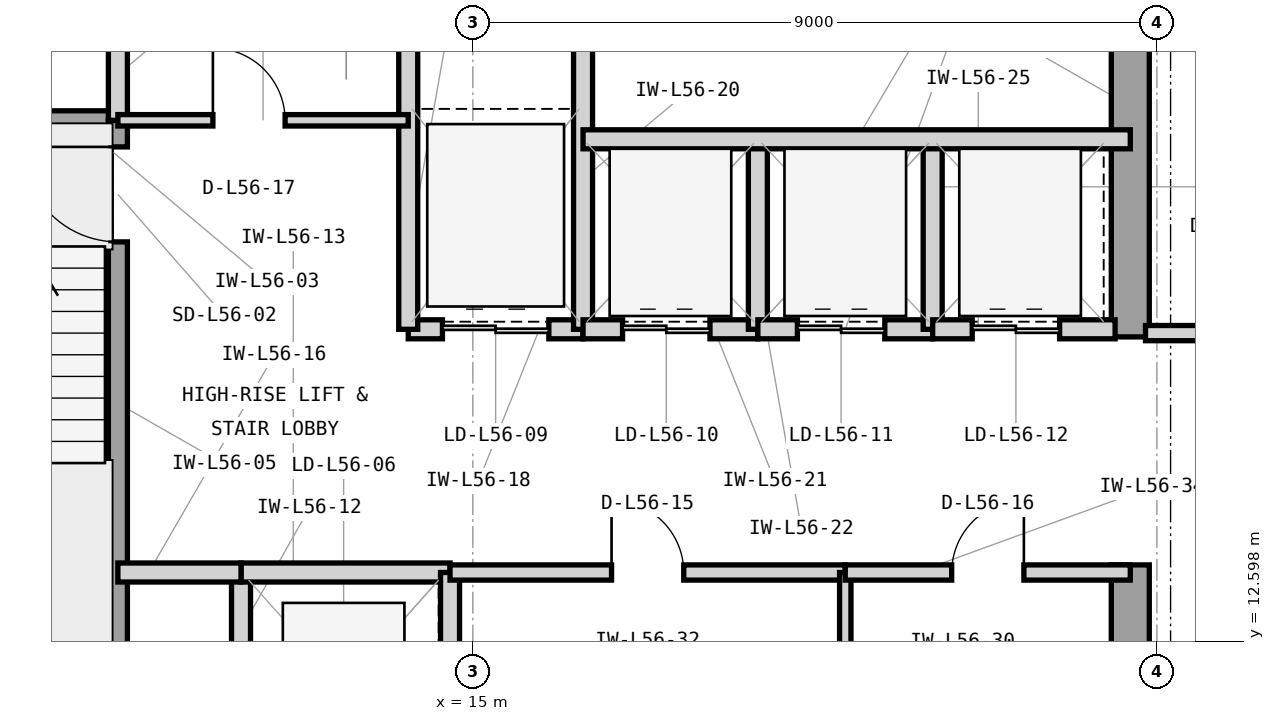
"""IFC4 building model, lengths in metres.
Left out: names, types, materials, properties, quantities, classifications, styles, units other than length and angle.
Written with IfcOpenShell. Run it as: python <this file> out.ifc"""

import sys

from ifc_helpers import new_model, si_unit, direction, frame, frame_2d, origin, place, context, subcontext, project, spatial, rectangle, extrude, element, fill, save


model = new_model("IFC4")
c1 = context("Model", 3, precision=1e-05, world=origin(), true_north=direction((0.0, 1.0)))
c2 = subcontext(c1, "Body", "Model", "MODEL_VIEW")
j1 = project(units=[si_unit("LENGTHUNIT", "METRE"), si_unit("PLANEANGLEUNIT", "RADIAN")], contexts=[c1])
p1 = place(None, origin())
s1 = spatial("IfcSite", under=j1, at=p1, CompositionType="ELEMENT")
p2 = place(p1, origin())
s2 = spatial("IfcBuilding", under=s1, at=p2, CompositionType="ELEMENT")
p3 = place(p2, frame((0.0, 0.0, 231.3)))
s3 = spatial("IfcBuildingStorey", under=s2, at=p3, CompositionType="ELEMENT", Elevation=231.3)
p4 = place(p3, frame((23.65, 10.4, 0.0), z_axis=(0.0, 0.0, 1.0), x_axis=(0.0, 1.0, 0.0)))
e1 = element("IfcWall", 1, at=p4, inside=s3, PredefinedType="SHEAR", context=c2, shape_type="SweptSolid", body=[
    extrude(rectangle(XDim=3.2, YDim=0.5, at=frame_2d((1.6, 0.0))), origin(), (0.0, 0.0, 1.0), 3.9),
])
p5 = place(p3, frame((23.65, 16.6, 0.0), z_axis=(0.0, 0.0, 1.0), x_axis=(0.0, 1.0, 0.0)))
e2 = element("IfcWall", 2, at=p5, inside=s3, PredefinedType="SHEAR", context=c2, shape_type="SweptSolid", body=[
    extrude(rectangle(XDim=4.05, YDim=0.5, at=frame_2d((2.025, 0.0))), origin(), (0.0, 0.0, 1.0), 3.9),
])
p6 = place(p3, frame((7.7, 19.45, 0.0), z_axis=(0.0, 0.0, 1.0), x_axis=(1.0, 0.0, 0.0)))
e3 = element("IfcWall", 3, at=p6, inside=s3, PredefinedType="SHEAR", context=c2, shape_type="SweptSolid", body=[
    extrude(rectangle(XDim=2.755, YDim=0.25, at=frame_2d((1.377, 0.0))), origin(), (0.0, 0.0, 1.0), 3.9),
])
p7 = place(p3, frame((10.33, 12.0, 0.0), z_axis=(0.0, 0.0, 1.0), x_axis=(0.0, 1.0, 0.0)))
e4 = element("IfcWall", 4, at=p7, inside=s3, PredefinedType="SHEAR", context=c2, shape_type="SweptSolid", body=[
    extrude(rectangle(XDim=7.45, YDim=0.25, at=frame_2d((3.725, 0.0))), origin(), (0.0, 0.0, 1.0), 3.9),
])
p8 = place(p7, frame((5.85, 0.0, 0.0)))
e5 = element("IfcOpeningElement", 5, at=p8, cuts=e4, PredefinedType="OPENING", context=c2, shape_type="SweptSolid", body=[
    extrude(rectangle(XDim=1.25, YDim=2.2, at=frame_2d((0.625, 1.1))), frame((0.0, 0.135, 0.0), z_axis=(0.0, -1.0, 0.0), x_axis=(1.0, 0.0, 0.0)), (0.0, 0.0, 1.0), 0.27),
])
p9 = place(p3, frame((10.33, 19.45, 0.0), z_axis=(0.0, 0.0, 1.0), x_axis=(0.0, 1.0, 0.0)))
e6 = element("IfcWall", 6, at=p9, inside=s3, PredefinedType="PARTITIONING", context=c2, shape_type="SweptSolid", body=[
    extrude(rectangle(XDim=1.2, YDim=0.25, at=frame_2d((0.6, 0.0))), origin(), (0.0, 0.0, 1.0), 3.69),
])
p10 = place(p3, frame((11.95, 10.5, 0.0), z_axis=(0.0, 0.0, 1.0), x_axis=(0.0, 1.0, 0.0)))
e7 = element("IfcWall", 7, at=p10, inside=s3, PredefinedType="PARTITIONING", context=c2, shape_type="SweptSolid", body=[
    extrude(rectangle(XDim=3.0, YDim=0.25, at=frame_2d((1.5, 0.0))), origin(), (0.0, 0.0, 1.0), 3.69),
])
p11 = place(p3, frame((11.95, 13.5, 0.0), z_axis=(0.0, 0.0, 1.0), x_axis=(1.0, 0.0, 0.0)))
e8 = element("IfcWall", 8, at=p11, inside=s3, PredefinedType="PARTITIONING", context=c2, shape_type="SweptSolid", body=[
    extrude(rectangle(XDim=2.75, YDim=0.25, at=frame_2d((1.375, 0.0))), origin(), (0.0, 0.0, 1.0), 3.073),
])
p12 = place(p3, frame((14.7, 10.5, 0.0), z_axis=(0.0, 0.0, 1.0), x_axis=(0.0, 1.0, 0.0)))
e9 = element("IfcWall", 9, at=p12, inside=s3, PredefinedType="PARTITIONING", context=c2, shape_type="SweptSolid", body=[
    extrude(rectangle(XDim=3.0, YDim=0.25, at=frame_2d((1.5, 0.0))), origin(), (0.0, 0.0, 1.0), 3.69),
])
p13 = place(p3, frame((10.33, 13.5, 0.0), z_axis=(0.0, 0.0, 1.0), x_axis=(1.0, 0.0, 0.0)))
e10 = element("IfcWall", 10, at=p13, inside=s3, PredefinedType="PARTITIONING", context=c2, shape_type="SweptSolid", body=[
    extrude(rectangle(XDim=1.62, YDim=0.25, at=frame_2d((0.81, 0.0))), origin(), (0.0, 0.0, 1.0), 3.073),
])
p14 = place(p3, frame((14.15, 16.7, 0.0), z_axis=(0.0, 0.0, 1.0), x_axis=(1.0, 0.0, 0.0)))
e11 = element("IfcWall", 11, at=p14, inside=s3, PredefinedType="PARTITIONING", context=c2, shape_type="SweptSolid", body=[
    extrude(rectangle(XDim=2.3, YDim=0.25, at=frame_2d((1.15, 0.0))), origin(), (0.0, 0.0, 1.0), 3.073),
])
p15 = place(p14, frame((0.45, 0.0, 0.0)))
e12 = element("IfcOpeningElement", 12, at=p15, cuts=e11, PredefinedType="OPENING", context=c2, shape_type="SweptSolid", body=[
    extrude(rectangle(XDim=1.4, YDim=2.35, at=frame_2d((0.7, 1.175))), frame((0.0, 0.135, 0.0), z_axis=(0.0, -1.0, 0.0), x_axis=(1.0, 0.0, 0.0)), (0.0, 0.0, 1.0), 0.27),
])
for number, where, z_axis, x_axis in (
    (13, (14.15, 16.7, 0.0), (0.0, 0.0, 1.0), (0.0, 1.0, 0.0)),
    (14, (16.45, 16.7, 0.0), (0.0, 0.0, 1.0), (0.0, 1.0, 0.0)),
):
    element("IfcWall", number, at=place(p3, frame(where, z_axis=z_axis, x_axis=x_axis)), inside=s3, PredefinedType="PARTITIONING", context=c2, shape_type="SweptSolid", body=[
        extrude(rectangle(XDim=3.95, YDim=0.25, at=frame_2d((1.975, 0.0))), origin(), (0.0, 0.0, 1.0), 3.69),
    ])
p16 = place(p3, frame((16.45, 16.7, 0.0), z_axis=(0.0, 0.0, 1.0), x_axis=(1.0, 0.0, 0.0)))
e15 = element("IfcWall", 15, at=p16, inside=s3, PredefinedType="PARTITIONING", context=c2, shape_type="SweptSolid", body=[
    extrude(rectangle(XDim=2.3, YDim=0.25, at=frame_2d((1.15, 0.0))), origin(), (0.0, 0.0, 1.0), 3.073),
])
p17 = place(p16, frame((0.52, 0.0, 0.0)))
e16 = element("IfcOpeningElement", 16, at=p17, cuts=e15, PredefinedType="OPENING", context=c2, shape_type="SweptSolid", body=[
    extrude(rectangle(XDim=1.15, YDim=2.25, at=frame_2d((0.575, 1.125))), frame((0.0, 0.135, 0.0), z_axis=(0.0, -1.0, 0.0), x_axis=(1.0, 0.0, 0.0)), (0.0, 0.0, 1.0), 0.27),
])
p18 = place(p3, frame((18.75, 16.7, 0.0), z_axis=(0.0, 0.0, 1.0), x_axis=(0.0, 1.0, 0.0)))
e17 = element("IfcWall", 17, at=p18, inside=s3, PredefinedType="PARTITIONING", context=c2, shape_type="SweptSolid", body=[
    extrude(rectangle(XDim=2.5, YDim=0.25, at=frame_2d((1.25, 0.0))), origin(), (0.0, 0.0, 1.0), 3.69),
])
p19 = place(p3, frame((18.75, 16.7, 0.0), z_axis=(0.0, 0.0, 1.0), x_axis=(1.0, 0.0, 0.0)))
e18 = element("IfcWall", 18, at=p19, inside=s3, PredefinedType="PARTITIONING", context=c2, shape_type="SweptSolid", body=[
    extrude(rectangle(XDim=2.3, YDim=0.25, at=frame_2d((1.15, 0.0))), origin(), (0.0, 0.0, 1.0), 3.073),
])
p20 = place(p19, frame((0.52, 0.0, 0.0)))
e19 = element("IfcOpeningElement", 19, at=p20, cuts=e18, PredefinedType="OPENING", context=c2, shape_type="SweptSolid", body=[
    extrude(rectangle(XDim=1.15, YDim=2.25, at=frame_2d((0.575, 1.125))), frame((0.0, 0.135, 0.0), z_axis=(0.0, -1.0, 0.0), x_axis=(1.0, 0.0, 0.0)), (0.0, 0.0, 1.0), 0.27),
])
p21 = place(p3, frame((21.05, 16.7, 0.0), z_axis=(0.0, 0.0, 1.0), x_axis=(0.0, 1.0, 0.0)))
e20 = element("IfcWall", 20, at=p21, inside=s3, PredefinedType="PARTITIONING", context=c2, shape_type="SweptSolid", body=[
    extrude(rectangle(XDim=2.5, YDim=0.25, at=frame_2d((1.25, 0.0))), origin(), (0.0, 0.0, 1.0), 3.69),
])
p22 = place(p3, frame((21.05, 16.7, 0.0), z_axis=(0.0, 0.0, 1.0), x_axis=(1.0, 0.0, 0.0)))
e21 = element("IfcWall", 21, at=p22, inside=s3, PredefinedType="PARTITIONING", context=c2, shape_type="SweptSolid", body=[
    extrude(rectangle(XDim=2.4, YDim=0.25, at=frame_2d((1.2, 0.0))), origin(), (0.0, 0.0, 1.0), 3.073),
])
p23 = place(p22, frame((0.52, 0.0, 0.0)))
e22 = element("IfcOpeningElement", 22, at=p23, cuts=e21, PredefinedType="OPENING", context=c2, shape_type="SweptSolid", body=[
    extrude(rectangle(XDim=1.15, YDim=2.25, at=frame_2d((0.575, 1.125))), frame((0.0, 0.135, 0.0), z_axis=(0.0, -1.0, 0.0), x_axis=(1.0, 0.0, 0.0)), (0.0, 0.0, 1.0), 0.27),
])
p24 = place(p3, frame((16.45, 19.2, 0.0), z_axis=(0.0, 0.0, 1.0), x_axis=(1.0, 0.0, 0.0)))
e23 = element("IfcWall", 23, at=p24, inside=s3, PredefinedType="PARTITIONING", context=c2, shape_type="SweptSolid", body=[
    extrude(rectangle(XDim=7.2, YDim=0.25, at=frame_2d((3.6, 0.0))), origin(), (0.0, 0.0, 1.0), 3.69),
])
p25 = place(p3, frame((14.7, 13.5, 0.0), z_axis=(0.0, 0.0, 1.0), x_axis=(1.0, 0.0, 0.0)))
e24 = element("IfcWall", 24, at=p25, inside=s3, PredefinedType="PARTITIONING", context=c2, shape_type="SweptSolid", body=[
    extrude(rectangle(XDim=5.2, YDim=0.2, at=frame_2d((2.6, 0.0))), origin(), (0.0, 0.0, 1.0), 3.073),
])
p26 = place(p25, frame((2.125, 0.0, 0.0)))
e25 = element("IfcOpeningElement", 25, at=p26, cuts=e24, PredefinedType="OPENING", context=c2, shape_type="SweptSolid", body=[
    extrude(rectangle(XDim=0.95, YDim=2.1, at=frame_2d((0.475, 1.05))), frame((0.0, 0.11, 0.0), z_axis=(0.0, -1.0, 0.0), x_axis=(1.0, 0.0, 0.0)), (0.0, 0.0, 1.0), 0.22),
])
p27 = place(p3, frame((19.9, 9.88, 0.0), z_axis=(0.0, 0.0, 1.0), x_axis=(0.0, 1.0, 0.0)))
e26 = element("IfcWall", 26, at=p27, inside=s3, PredefinedType="PARTITIONING", context=c2, shape_type="SweptSolid", body=[
    extrude(rectangle(XDim=3.62, YDim=0.15, at=frame_2d((1.81, 0.0))), origin(), (0.0, 0.0, 1.0), 3.69),
])
p28 = place(p3, frame((19.9, 13.5, 0.0), z_axis=(0.0, 0.0, 1.0), x_axis=(1.0, 0.0, 0.0)))
e27 = element("IfcWall", 27, at=p28, inside=s3, PredefinedType="PARTITIONING", context=c2, shape_type="SweptSolid", body=[
    extrude(rectangle(XDim=3.75, YDim=0.2, at=frame_2d((1.875, 0.0))), origin(), (0.0, 0.0, 1.0), 3.073),
])
p29 = place(p28, frame((1.4, 0.0, 0.0)))
e28 = element("IfcOpeningElement", 28, at=p29, cuts=e27, PredefinedType="OPENING", context=c2, shape_type="SweptSolid", body=[
    extrude(rectangle(XDim=0.95, YDim=2.1, at=frame_2d((0.475, 1.05))), frame((0.0, 0.11, 0.0), z_axis=(0.0, -1.0, 0.0), x_axis=(1.0, 0.0, 0.0)), (0.0, 0.0, 1.0), 0.22),
])
p30 = place(p3, frame((10.33, 19.45, 0.0), z_axis=(0.0, 0.0, 1.0), x_axis=(1.0, 0.0, 0.0)))
e29 = element("IfcWall", 29, at=p30, inside=s3, PredefinedType="PARTITIONING", context=c2, shape_type="SweptSolid", body=[
    extrude(rectangle(XDim=3.82, YDim=0.15, at=frame_2d((1.91, 0.0))), origin(), (0.0, 0.0, 1.0), 3.69),
])
p31 = place(p30, frame((1.25, 0.0, 0.0)))
e30 = element("IfcOpeningElement", 30, at=p31, cuts=e29, PredefinedType="OPENING", context=c2, shape_type="SweptSolid", body=[
    extrude(rectangle(XDim=0.95, YDim=2.1, at=frame_2d((0.475, 1.05))), frame((0.0, 0.085, 0.0), z_axis=(0.0, -1.0, 0.0), x_axis=(1.0, 0.0, 0.0)), (0.0, 0.0, 1.0), 0.17),
])
p32 = place(p3, frame((23.85, 16.65, 0.0), z_axis=(0.0, 0.0, 1.0), x_axis=(1.0, 0.0, 0.0)))
e31 = element("IfcWall", 31, at=p32, inside=s3, PredefinedType="PARTITIONING", context=c2, shape_type="SweptSolid", body=[
    extrude(rectangle(XDim=2.85, YDim=0.2, at=frame_2d((1.425, 0.0))), origin(), (0.0, 0.0, 1.0), 3.69),
])
p33 = place(p32, frame((0.7, 0.0, 0.0)))
e32 = element("IfcOpeningElement", 32, at=p33, cuts=e31, PredefinedType="OPENING", context=c2, shape_type="SweptSolid", body=[
    extrude(rectangle(XDim=1.0, YDim=2.15, at=frame_2d((0.5, 1.075))), frame((0.0, 0.11, 0.0), z_axis=(0.0, -1.0, 0.0), x_axis=(1.0, 0.0, 0.0)), (0.0, 0.0, 1.0), 0.22),
])
p34 = place(p8, origin())
e33 = element("IfcDoor", 33, at=p34, inside=s3, OperationType="SINGLE_SWING_RIGHT", PredefinedType="DOOR", context=c2, shape_type="SweptSolid", body=[
    extrude(rectangle(XDim=1.25, YDim=2.2, at=frame_2d((0.625, 1.1))), frame((0.0, 0.025, 0.0), z_axis=(0.0, -1.0, 0.0), x_axis=(1.0, 0.0, 0.0)), (0.0, 0.0, 1.0), 0.05),
])
fill(e5, e33)
p35 = place(p15, origin())
e34 = element("IfcDoor", 34, at=p35, inside=s3, OperationType="DOUBLE_DOOR_SLIDING", PredefinedType="DOOR", context=c2, shape_type="SweptSolid", body=[
    extrude(rectangle(XDim=1.4, YDim=2.35, at=frame_2d((0.7, 1.175))), frame((0.0, 0.025, 0.0), z_axis=(0.0, -1.0, 0.0), x_axis=(1.0, 0.0, 0.0)), (0.0, 0.0, 1.0), 0.05),
])
fill(e12, e34)
p36 = place(p17, origin())
e35 = element("IfcDoor", 35, at=p36, inside=s3, OperationType="DOUBLE_DOOR_SLIDING", PredefinedType="DOOR", context=c2, shape_type="SweptSolid", body=[
    extrude(rectangle(XDim=1.15, YDim=2.25, at=frame_2d((0.575, 1.125))), frame((0.0, 0.025, 0.0), z_axis=(0.0, -1.0, 0.0), x_axis=(1.0, 0.0, 0.0)), (0.0, 0.0, 1.0), 0.05),
])
fill(e16, e35)
p37 = place(p20, origin())
e36 = element("IfcDoor", 36, at=p37, inside=s3, OperationType="DOUBLE_DOOR_SLIDING", PredefinedType="DOOR", context=c2, shape_type="SweptSolid", body=[
    extrude(rectangle(XDim=1.15, YDim=2.25, at=frame_2d((0.575, 1.125))), frame((0.0, 0.025, 0.0), z_axis=(0.0, -1.0, 0.0), x_axis=(1.0, 0.0, 0.0)), (0.0, 0.0, 1.0), 0.05),
])
fill(e19, e36)
p38 = place(p23, origin())
e37 = element("IfcDoor", 37, at=p38, inside=s3, OperationType="DOUBLE_DOOR_SLIDING", PredefinedType="DOOR", context=c2, shape_type="SweptSolid", body=[
    extrude(rectangle(XDim=1.15, YDim=2.25, at=frame_2d((0.575, 1.125))), frame((0.0, 0.025, 0.0), z_axis=(0.0, -1.0, 0.0), x_axis=(1.0, 0.0, 0.0)), (0.0, 0.0, 1.0), 0.05),
])
fill(e22, e37)
p39 = place(p26, origin())
e38 = element("IfcDoor", 38, at=p39, inside=s3, OperationType="SINGLE_SWING_LEFT", PredefinedType="DOOR", context=c2, shape_type="SweptSolid", body=[
    extrude(rectangle(XDim=0.95, YDim=2.1, at=frame_2d((0.475, 1.05))), frame((0.0, 0.025, 0.0), z_axis=(0.0, -1.0, 0.0), x_axis=(1.0, 0.0, 0.0)), (0.0, 0.0, 1.0), 0.05),
])
fill(e25, e38)
p40 = place(p29, origin())
e39 = element("IfcDoor", 39, at=p40, inside=s3, OperationType="SINGLE_SWING_RIGHT", PredefinedType="DOOR", context=c2, shape_type="SweptSolid", body=[
    extrude(rectangle(XDim=0.95, YDim=2.1, at=frame_2d((0.475, 1.05))), frame((0.0, 0.025, 0.0), z_axis=(0.0, -1.0, 0.0), x_axis=(1.0, 0.0, 0.0)), (0.0, 0.0, 1.0), 0.05),
])
fill(e28, e39)
p41 = place(p31, origin())
e40 = element("IfcDoor", 40, at=p41, inside=s3, OperationType="SINGLE_SWING_LEFT", PredefinedType="DOOR", context=c2, shape_type="SweptSolid", body=[
    extrude(rectangle(XDim=0.95, YDim=2.1, at=frame_2d((0.475, 1.05))), frame((0.0, 0.025, 0.0), z_axis=(0.0, -1.0, 0.0), x_axis=(1.0, 0.0, 0.0)), (0.0, 0.0, 1.0), 0.05),
])
fill(e30, e40)
save(model, sys.argv[1])
